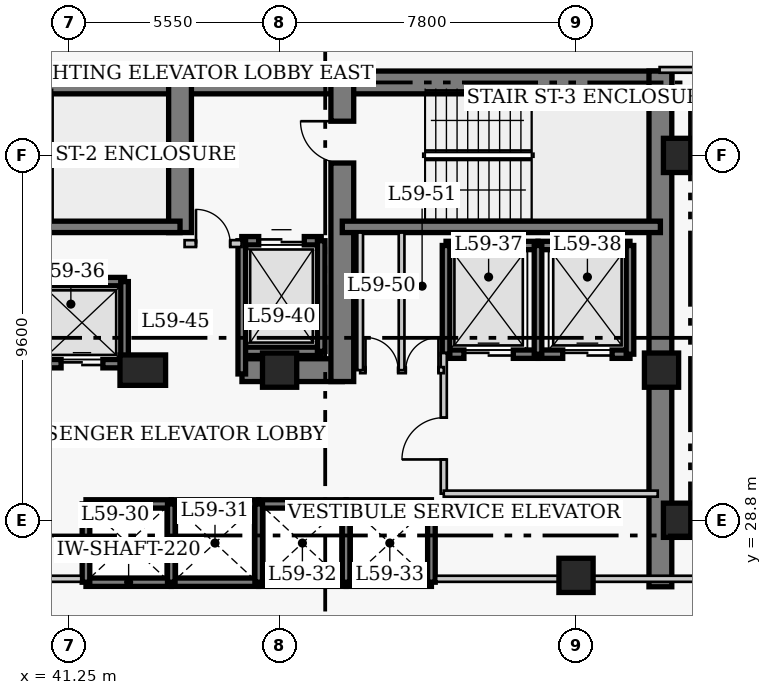
"""IFC4 building model, lengths in metres.
Left out: names, types, materials, properties, quantities, classifications, styles, units other than length and angle.
Written with IfcOpenShell. Run it as: python <this file> out.ifc"""

import sys

from ifc_helpers import new_model, si_unit, direction, frame, frame_2d, origin, origin_2d, place, context, subcontext, project, spatial, rectangle, extrude, element, fill, save


model = new_model("IFC4")
c1 = context("Model", 3, precision=1e-05, world=origin(), true_north=direction((0.0, 1.0)))
c2 = subcontext(c1, "Body", "Model", "MODEL_VIEW")
j1 = project(units=[si_unit("LENGTHUNIT", "METRE"), si_unit("PLANEANGLEUNIT", "RADIAN")], contexts=[c1])
p1 = place(None, origin())
s1 = spatial("IfcSite", under=j1, at=p1, CompositionType="ELEMENT")
p2 = place(p1, origin())
s2 = spatial("IfcBuilding", under=s1, at=p2, CompositionType="ELEMENT")
p3 = place(p2, frame((0.0, 0.0, 236.5)))
s3 = spatial("IfcBuildingStorey", under=s2, at=p3, CompositionType="ELEMENT", Elevation=236.5)
p4 = place(p3, frame((35.85, 40.32, 0.0), z_axis=(0.0, 0.0, 1.0), x_axis=(1.0, 0.0, 0.0)))
e1 = element("IfcWall", 1, at=p4, inside=s3, PredefinedType="SHEAR", context=c2, shape_type="SweptSolid", body=[
    extrude(rectangle(XDim=12.6, YDim=0.6, at=frame_2d((6.3, 0.0))), origin(), (0.0, 0.0, 1.0), 3.9),
])
p5 = place(p3, frame((48.45, 40.32, 0.0), z_axis=(0.0, 0.0, 1.0), x_axis=(1.0, 0.0, 0.0)))
e2 = element("IfcWall", 2, at=p5, inside=s3, PredefinedType="SHEAR", context=c2, shape_type="SweptSolid", body=[
    extrude(rectangle(XDim=8.67, YDim=0.6, at=frame_2d((4.335, 0.0))), origin(), (0.0, 0.0, 1.0), 3.9),
])
p6 = place(p3, frame((56.82, 27.05, 0.0), z_axis=(0.0, 0.0, 1.0), x_axis=(0.0, 1.0, 0.0)))
e3 = element("IfcWall", 3, at=p6, inside=s3, PredefinedType="SHEAR", context=c2, shape_type="SweptSolid", body=[
    extrude(rectangle(XDim=13.57, YDim=0.6, at=frame_2d((6.785, 0.0))), origin(), (0.0, 0.0, 1.0), 3.9),
])
p7 = place(p3, frame((45.81, 32.75, 0.0), z_axis=(0.0, 0.0, 1.0), x_axis=(1.0, 0.0, 0.0)))
e4 = element("IfcWall", 4, at=p7, inside=s3, PredefinedType="SHEAR", context=c2, shape_type="SweptSolid", body=[
    extrude(rectangle(XDim=2.64, YDim=0.6, at=frame_2d((1.32, 0.0))), origin(), (0.0, 0.0, 1.0), 3.9),
])
p8 = place(p3, frame((44.18, 36.37, 0.0), z_axis=(0.0, 0.0, 1.0), x_axis=(0.0, 1.0, 0.0)))
e5 = element("IfcWall", 5, at=p8, inside=s3, PredefinedType="SHEAR", context=c2, shape_type="SweptSolid", body=[
    extrude(rectangle(XDim=3.95, YDim=0.6, at=frame_2d((1.975, 0.0))), origin(), (0.0, 0.0, 1.0), 3.9),
])
p9 = place(p3, frame((48.45, 32.45, 0.0), z_axis=(0.0, 0.0, 1.0), x_axis=(0.0, 1.0, 0.0)))
e6 = element("IfcWall", 6, at=p9, inside=s3, PredefinedType="SHEAR", context=c2, shape_type="SweptSolid", body=[
    extrude(rectangle(XDim=7.87, YDim=0.6, at=frame_2d((3.935, 0.0))), origin(), (0.0, 0.0, 1.0), 3.9),
])
p10 = place(p9, frame((5.75, 0.0, 0.0)))
e7 = element("IfcOpeningElement", 7, at=p10, cuts=e6, PredefinedType="OPENING", context=c2, shape_type="SweptSolid", body=[
    extrude(rectangle(XDim=1.1, YDim=2.15, at=frame_2d((0.55, 1.075))), frame((0.0, 0.31, 0.0), z_axis=(0.0, -1.0, 0.0), x_axis=(1.0, 0.0, 0.0)), (0.0, 0.0, 1.0), 0.62),
])
p11 = place(p3, frame((35.85, 36.52, 0.0), z_axis=(0.0, 0.0, 1.0), x_axis=(1.0, 0.0, 0.0)))
e8 = element("IfcWall", 8, at=p11, inside=s3, PredefinedType="SHEAR", context=c2, shape_type="SweptSolid", body=[
    extrude(rectangle(XDim=8.33, YDim=0.3, at=frame_2d((4.165, 0.0))), origin(), (0.0, 0.0, 1.0), 3.9),
])
p12 = place(p3, frame((48.45, 36.52, 0.0), z_axis=(0.0, 0.0, 1.0), x_axis=(1.0, 0.0, 0.0)))
e9 = element("IfcWall", 9, at=p12, inside=s3, PredefinedType="SHEAR", context=c2, shape_type="SweptSolid", body=[
    extrude(rectangle(XDim=8.37, YDim=0.3, at=frame_2d((4.185, 0.0))), origin(), (0.0, 0.0, 1.0), 3.9),
])
for number, where, z_axis, x_axis in (
    (10, (57.35, 28.8, 0.0), (0.0, 0.0, 1.0), (1.0, 0.0, 0.0)),
    (11, (57.35, 38.4, 0.0), (0.0, 0.0, 1.0), (1.0, 0.0, 0.0)),
):
    element("IfcColumn", number, at=place(p3, frame(where, z_axis=z_axis, x_axis=x_axis)), inside=s3, PredefinedType="COLUMN", context=c2, shape_type="SweptSolid", body=[
        extrude(rectangle(XDim=0.9, YDim=0.9, at=origin_2d()), origin(), (0.0, 0.0, 1.0), 3.9),
    ])
p13 = place(p3, frame((43.2, 32.75, 0.0), z_axis=(0.0, 0.0, 1.0), x_axis=(1.0, 0.0, 0.0)))
e12 = element("IfcColumn", 12, at=p13, inside=s3, PredefinedType="COLUMN", context=c2, shape_type="SweptSolid", body=[
    extrude(rectangle(XDim=1.2, YDim=0.8, at=origin_2d()), origin(), (0.0, 0.0, 1.0), 3.9),
])
for number, where, z_axis, x_axis in (
    (13, (46.8, 32.75, 0.0), (0.0, 0.0, 1.0), (1.0, 0.0, 0.0)),
    (14, (54.6, 27.35, 0.0), (0.0, 0.0, 1.0), (1.0, 0.0, 0.0)),
    (15, (56.85, 32.75, 0.0), (0.0, 0.0, 1.0), (1.0, 0.0, 0.0)),
):
    element("IfcColumn", number, at=place(p3, frame(where, z_axis=z_axis, x_axis=x_axis)), inside=s3, PredefinedType="COLUMN", context=c2, shape_type="SweptSolid", body=[
        extrude(rectangle(XDim=0.9, YDim=0.9, at=origin_2d()), origin(), (0.0, 0.0, 1.0), 3.9),
    ])
for number, where, z_axis, x_axis in (
    (16, (41.705, 29.23, 0.0), (0.0, 0.0, 1.0), (1.0, 0.0, 0.0)),
    (17, (41.705, 27.17, 0.0), (0.0, 0.0, 1.0), (1.0, 0.0, 0.0)),
):
    element("IfcWall", number, at=place(p3, frame(where, z_axis=z_axis, x_axis=x_axis)), inside=s3, PredefinedType="SHEAR", context=c2, shape_type="SweptSolid", body=[
        extrude(rectangle(XDim=2.245, YDim=0.22, at=frame_2d((1.123, 0.0))), origin(), (0.0, 0.0, 1.0), 3.9),
    ])
p14 = place(p3, frame((41.705, 27.17, 0.0), z_axis=(0.0, 0.0, 1.0), x_axis=(0.0, 1.0, 0.0)))
e18 = element("IfcWall", 18, at=p14, inside=s3, PredefinedType="SHEAR", context=c2, shape_type="SweptSolid", body=[
    extrude(rectangle(XDim=2.06, YDim=0.2, at=frame_2d((1.03, 0.0))), origin(), (0.0, 0.0, 1.0), 3.9),
])
for number, where, z_axis, x_axis in (
    (19, (43.95, 29.23, 0.0), (0.0, 0.0, 1.0), (1.0, 0.0, 0.0)),
    (20, (43.95, 27.17, 0.0), (0.0, 0.0, 1.0), (1.0, 0.0, 0.0)),
):
    element("IfcWall", number, at=place(p3, frame(where, z_axis=z_axis, x_axis=x_axis)), inside=s3, PredefinedType="SHEAR", context=c2, shape_type="SweptSolid", body=[
        extrude(rectangle(XDim=2.3, YDim=0.22, at=frame_2d((1.15, 0.0))), origin(), (0.0, 0.0, 1.0), 3.9),
    ])
p15 = place(p3, frame((43.95, 27.17, 0.0), z_axis=(0.0, 0.0, 1.0), x_axis=(0.0, 1.0, 0.0)))
e21 = element("IfcWall", 21, at=p15, inside=s3, PredefinedType="SHEAR", context=c2, shape_type="SweptSolid", body=[
    extrude(rectangle(XDim=2.06, YDim=0.2, at=frame_2d((1.03, 0.0))), origin(), (0.0, 0.0, 1.0), 3.9),
])
for number, where, z_axis, x_axis in (
    (22, (46.25, 29.23, 0.0), (0.0, 0.0, 1.0), (1.0, 0.0, 0.0)),
    (23, (46.25, 27.17, 0.0), (0.0, 0.0, 1.0), (1.0, 0.0, 0.0)),
):
    element("IfcWall", number, at=place(p3, frame(where, z_axis=z_axis, x_axis=x_axis)), inside=s3, PredefinedType="SHEAR", context=c2, shape_type="SweptSolid", body=[
        extrude(rectangle(XDim=2.3, YDim=0.22, at=frame_2d((1.15, 0.0))), origin(), (0.0, 0.0, 1.0), 3.9),
    ])
p16 = place(p3, frame((46.25, 27.17, 0.0), z_axis=(0.0, 0.0, 1.0), x_axis=(0.0, 1.0, 0.0)))
e24 = element("IfcWall", 24, at=p16, inside=s3, PredefinedType="SHEAR", context=c2, shape_type="SweptSolid", body=[
    extrude(rectangle(XDim=2.06, YDim=0.2, at=frame_2d((1.03, 0.0))), origin(), (0.0, 0.0, 1.0), 3.9),
])
for number, where, z_axis, x_axis in (
    (25, (48.55, 29.23, 0.0), (0.0, 0.0, 1.0), (1.0, 0.0, 0.0)),
    (26, (48.55, 27.17, 0.0), (0.0, 0.0, 1.0), (1.0, 0.0, 0.0)),
):
    element("IfcWall", number, at=place(p3, frame(where, z_axis=z_axis, x_axis=x_axis)), inside=s3, PredefinedType="SHEAR", context=c2, shape_type="SweptSolid", body=[
        extrude(rectangle(XDim=2.245, YDim=0.22, at=frame_2d((1.123, 0.0))), origin(), (0.0, 0.0, 1.0), 3.9),
    ])
for number, where, z_axis, x_axis in (
    (27, (48.55, 27.17, 0.0), (0.0, 0.0, 1.0), (0.0, 1.0, 0.0)),
    (28, (50.795, 27.17, 0.0), (0.0, 0.0, 1.0), (0.0, 1.0, 0.0)),
):
    element("IfcWall", number, at=place(p3, frame(where, z_axis=z_axis, x_axis=x_axis)), inside=s3, PredefinedType="SHEAR", context=c2, shape_type="SweptSolid", body=[
        extrude(rectangle(XDim=2.06, YDim=0.2, at=frame_2d((1.03, 0.0))), origin(), (0.0, 0.0, 1.0), 3.9),
    ])
p17 = place(p3, frame((40.4, 35.08, 0.0), z_axis=(0.0, 0.0, 1.0), x_axis=(1.0, 0.0, 0.0)))
e29 = element("IfcWall", 29, at=p17, inside=s3, PredefinedType="SHEAR", context=c2, shape_type="SweptSolid", body=[
    extrude(rectangle(XDim=2.32, YDim=0.22, at=frame_2d((1.16, 0.0))), origin(), (0.0, 0.0, 1.0), 3.9),
])
p18 = place(p3, frame((40.4, 32.92, 0.0), z_axis=(0.0, 0.0, 1.0), x_axis=(1.0, 0.0, 0.0)))
e30 = element("IfcWall", 30, at=p18, inside=s3, PredefinedType="SHEAR", context=c2, shape_type="SweptSolid", body=[
    extrude(rectangle(XDim=2.32, YDim=0.22, at=frame_2d((1.16, 0.0))), origin(), (0.0, 0.0, 1.0), 3.9),
])
p19 = place(p18, frame((0.65, 0.0, 0.0)))
e31 = element("IfcOpeningElement", 31, at=p19, cuts=e30, PredefinedType="OPENING", context=c2, shape_type="SweptSolid", body=[
    extrude(rectangle(XDim=1.1, YDim=2.15, at=frame_2d((0.55, 1.075))), frame((0.0, 0.12, 0.0), z_axis=(0.0, -1.0, 0.0), x_axis=(1.0, 0.0, 0.0)), (0.0, 0.0, 1.0), 0.24),
])
p20 = place(p3, frame((42.72, 32.92, 0.0), z_axis=(0.0, 0.0, 1.0), x_axis=(0.0, 1.0, 0.0)))
e32 = element("IfcWall", 32, at=p20, inside=s3, PredefinedType="SHEAR", context=c2, shape_type="SweptSolid", body=[
    extrude(rectangle(XDim=2.16, YDim=0.2, at=frame_2d((1.08, 0.0))), origin(), (0.0, 0.0, 1.0), 3.9),
])
p21 = place(p3, frame((51.18, 36.03, 0.0), z_axis=(0.0, 0.0, 1.0), x_axis=(1.0, 0.0, 0.0)))
e33 = element("IfcWall", 33, at=p21, inside=s3, PredefinedType="SHEAR", context=c2, shape_type="SweptSolid", body=[
    extrude(rectangle(XDim=2.42, YDim=0.22, at=frame_2d((1.21, 0.0))), origin(), (0.0, 0.0, 1.0), 3.9),
])
p22 = place(p3, frame((51.18, 33.17, 0.0), z_axis=(0.0, 0.0, 1.0), x_axis=(1.0, 0.0, 0.0)))
e34 = element("IfcWall", 34, at=p22, inside=s3, PredefinedType="SHEAR", context=c2, shape_type="SweptSolid", body=[
    extrude(rectangle(XDim=2.42, YDim=0.22, at=frame_2d((1.21, 0.0))), origin(), (0.0, 0.0, 1.0), 3.9),
])
p23 = place(p22, frame((0.47, 0.0, 0.0)))
e35 = element("IfcOpeningElement", 35, at=p23, cuts=e34, PredefinedType="OPENING", context=c2, shape_type="SweptSolid", body=[
    extrude(rectangle(XDim=1.3, YDim=2.15, at=frame_2d((0.65, 1.075))), frame((0.0, 0.12, 0.0), z_axis=(0.0, -1.0, 0.0), x_axis=(1.0, 0.0, 0.0)), (0.0, 0.0, 1.0), 0.24),
])
p24 = place(p3, frame((51.18, 33.17, 0.0), z_axis=(0.0, 0.0, 1.0), x_axis=(0.0, 1.0, 0.0)))
e36 = element("IfcWall", 36, at=p24, inside=s3, PredefinedType="SHEAR", context=c2, shape_type="SweptSolid", body=[
    extrude(rectangle(XDim=2.86, YDim=0.2, at=frame_2d((1.43, 0.0))), origin(), (0.0, 0.0, 1.0), 3.9),
])
p25 = place(p3, frame((53.6, 36.03, 0.0), z_axis=(0.0, 0.0, 1.0), x_axis=(1.0, 0.0, 0.0)))
e37 = element("IfcWall", 37, at=p25, inside=s3, PredefinedType="SHEAR", context=c2, shape_type="SweptSolid", body=[
    extrude(rectangle(XDim=2.42, YDim=0.22, at=frame_2d((1.21, 0.0))), origin(), (0.0, 0.0, 1.0), 3.9),
])
p26 = place(p3, frame((53.6, 33.17, 0.0), z_axis=(0.0, 0.0, 1.0), x_axis=(1.0, 0.0, 0.0)))
e38 = element("IfcWall", 38, at=p26, inside=s3, PredefinedType="SHEAR", context=c2, shape_type="SweptSolid", body=[
    extrude(rectangle(XDim=2.42, YDim=0.22, at=frame_2d((1.21, 0.0))), origin(), (0.0, 0.0, 1.0), 3.9),
])
p27 = place(p26, frame((0.65, 0.0, 0.0)))
e39 = element("IfcOpeningElement", 39, at=p27, cuts=e38, PredefinedType="OPENING", context=c2, shape_type="SweptSolid", body=[
    extrude(rectangle(XDim=1.3, YDim=2.15, at=frame_2d((0.65, 1.075))), frame((0.0, 0.12, 0.0), z_axis=(0.0, -1.0, 0.0), x_axis=(1.0, 0.0, 0.0)), (0.0, 0.0, 1.0), 0.24),
])
for number, where, z_axis, x_axis in (
    (40, (53.6, 33.17, 0.0), (0.0, 0.0, 1.0), (0.0, 1.0, 0.0)),
    (41, (56.02, 33.17, 0.0), (0.0, 0.0, 1.0), (0.0, 1.0, 0.0)),
):
    element("IfcWall", number, at=place(p3, frame(where, z_axis=z_axis, x_axis=x_axis)), inside=s3, PredefinedType="SHEAR", context=c2, shape_type="SweptSolid", body=[
        extrude(rectangle(XDim=2.86, YDim=0.2, at=frame_2d((1.43, 0.0))), origin(), (0.0, 0.0, 1.0), 3.9),
    ])
p28 = place(p3, frame((45.805, 36.155, 0.0), z_axis=(0.0, 0.0, 1.0), x_axis=(1.0, 0.0, 0.0)))
e42 = element("IfcWall", 42, at=p28, inside=s3, PredefinedType="SHEAR", context=c2, shape_type="SweptSolid", body=[
    extrude(rectangle(XDim=2.09, YDim=0.22, at=frame_2d((1.045, 0.0))), origin(), (0.0, 0.0, 1.0), 3.9),
])
p29 = place(p28, frame((0.445, 0.0, 0.0)))
e43 = element("IfcOpeningElement", 43, at=p29, cuts=e42, PredefinedType="OPENING", context=c2, shape_type="SweptSolid", body=[
    extrude(rectangle(XDim=1.2, YDim=2.15, at=frame_2d((0.6, 1.075))), frame((0.0, 0.12, 0.0), z_axis=(0.0, -1.0, 0.0), x_axis=(1.0, 0.0, 0.0)), (0.0, 0.0, 1.0), 0.24),
])
p30 = place(p3, frame((45.805, 33.245, 0.0), z_axis=(0.0, 0.0, 1.0), x_axis=(1.0, 0.0, 0.0)))
e44 = element("IfcWall", 44, at=p30, inside=s3, PredefinedType="SHEAR", context=c2, shape_type="SweptSolid", body=[
    extrude(rectangle(XDim=2.09, YDim=0.22, at=frame_2d((1.045, 0.0))), origin(), (0.0, 0.0, 1.0), 3.9),
])
p31 = place(p3, frame((45.805, 32.65, 0.0), z_axis=(0.0, 0.0, 1.0), x_axis=(0.0, 1.0, 0.0)))
e45 = element("IfcWall", 45, at=p31, inside=s3, PredefinedType="SHEAR", context=c2, shape_type="SweptSolid", body=[
    extrude(rectangle(XDim=3.505, YDim=0.2, at=frame_2d((1.752, 0.0))), origin(), (0.0, 0.0, 1.0), 3.9),
])
p32 = place(p3, frame((47.895, 33.245, 0.0), z_axis=(0.0, 0.0, 1.0), x_axis=(0.0, 1.0, 0.0)))
e46 = element("IfcWall", 46, at=p32, inside=s3, PredefinedType="SHEAR", context=c2, shape_type="SweptSolid", body=[
    extrude(rectangle(XDim=2.91, YDim=0.2, at=frame_2d((1.455, 0.0))), origin(), (0.0, 0.0, 1.0), 3.9),
])
p33 = place(p3, frame((44.3, 36.08, 0.0), z_axis=(0.0, 0.0, 1.0), x_axis=(1.0, 0.0, 0.0)))
e47 = element("IfcWall", 47, at=p33, inside=s3, PredefinedType="PARTITIONING", context=c2, shape_type="SweptSolid", body=[
    extrude(rectangle(XDim=1.5, YDim=0.18, at=frame_2d((0.75, 0.0))), origin(), (0.0, 0.0, 1.0), 3.52),
])
p34 = place(p33, frame((0.3, 0.0, 0.0)))
e48 = element("IfcOpeningElement", 48, at=p34, cuts=e47, PredefinedType="OPENING", context=c2, shape_type="SweptSolid", body=[
    extrude(rectangle(XDim=0.9, YDim=2.15, at=frame_2d((0.45, 1.075))), frame((0.0, 0.1, 0.0), z_axis=(0.0, -1.0, 0.0), x_axis=(1.0, 0.0, 0.0)), (0.0, 0.0, 1.0), 0.2),
])
p35 = place(p3, frame((51.12, 29.5, 0.0), z_axis=(0.0, 0.0, 1.0), x_axis=(0.0, 1.0, 0.0)))
e49 = element("IfcWall", 49, at=p35, inside=s3, PredefinedType="PARTITIONING", context=c2, shape_type="SweptSolid", body=[
    extrude(rectangle(XDim=3.7, YDim=0.16, at=frame_2d((1.85, 0.0))), origin(), (0.0, 0.0, 1.0), 3.52),
])
p36 = place(p35, frame((0.9, 0.0, 0.0)))
e50 = element("IfcOpeningElement", 50, at=p36, cuts=e49, PredefinedType="OPENING", context=c2, shape_type="SweptSolid", body=[
    extrude(rectangle(XDim=1.1, YDim=2.15, at=frame_2d((0.55, 1.075))), frame((0.0, 0.09, 0.0), z_axis=(0.0, -1.0, 0.0), x_axis=(1.0, 0.0, 0.0)), (0.0, 0.0, 1.0), 0.18),
])
p37 = place(p3, frame((51.12, 29.5, 0.0), z_axis=(0.0, 0.0, 1.0), x_axis=(1.0, 0.0, 0.0)))
e51 = element("IfcWall", 51, at=p37, inside=s3, PredefinedType="PARTITIONING", context=c2, shape_type="SweptSolid", body=[
    extrude(rectangle(XDim=5.63, YDim=0.16, at=frame_2d((2.815, 0.0))), origin(), (0.0, 0.0, 1.0), 3.52),
])
p38 = place(p3, frame((48.92, 32.75, 0.0), z_axis=(0.0, 0.0, 1.0), x_axis=(1.0, 0.0, 0.0)))
e52 = element("IfcWall", 52, at=p38, inside=s3, PredefinedType="PARTITIONING", context=c2, shape_type="SweptSolid", body=[
    extrude(rectangle(XDim=2.2, YDim=0.16, at=frame_2d((1.1, 0.0))), origin(), (0.0, 0.0, 1.0), 3.52),
])
p39 = place(p38, frame((0.14, 0.0, 0.0)))
e53 = element("IfcOpeningElement", 53, at=p39, cuts=e52, PredefinedType="OPENING", context=c2, shape_type="SweptSolid", body=[
    extrude(rectangle(XDim=0.86, YDim=2.05, at=frame_2d((0.43, 1.025))), frame((0.0, 0.09, 0.0), z_axis=(0.0, -1.0, 0.0), x_axis=(1.0, 0.0, 0.0)), (0.0, 0.0, 1.0), 0.18),
])
p40 = place(p38, frame((1.2, 0.0, 0.0)))
e54 = element("IfcOpeningElement", 54, at=p40, cuts=e52, PredefinedType="OPENING", context=c2, shape_type="SweptSolid", body=[
    extrude(rectangle(XDim=0.86, YDim=2.05, at=frame_2d((0.43, 1.025))), frame((0.0, 0.09, 0.0), z_axis=(0.0, -1.0, 0.0), x_axis=(1.0, 0.0, 0.0)), (0.0, 0.0, 1.0), 0.18),
])
for number, where, z_axis, x_axis in (
    (55, (48.92, 32.75, 0.0), (0.0, 0.0, 1.0), (0.0, 1.0, 0.0)),
    (56, (50.01, 32.75, 0.0), (0.0, 0.0, 1.0), (0.0, 1.0, 0.0)),
):
    element("IfcWall", number, at=place(p3, frame(where, z_axis=z_axis, x_axis=x_axis)), inside=s3, PredefinedType="PARTITIONING", context=c2, shape_type="SweptSolid", body=[
        extrude(rectangle(XDim=3.62, YDim=0.15, at=frame_2d((1.81, 0.0))), origin(), (0.0, 0.0, 1.0), 3.52),
    ])
p41 = place(p3, frame((35.85, 27.26, 0.0), z_axis=(0.0, 0.0, 1.0), x_axis=(1.0, 0.0, 0.0)))
e57 = element("IfcWall", 57, at=p41, inside=s3, PredefinedType="PARTITIONING", context=c2, shape_type="SweptSolid", body=[
    extrude(rectangle(XDim=5.73, YDim=0.16, at=frame_2d((2.865, 0.0))), origin(), (0.0, 0.0, 1.0), 3.52),
])
p42 = place(p3, frame((50.92, 27.26, 0.0), z_axis=(0.0, 0.0, 1.0), x_axis=(1.0, 0.0, 0.0)))
e58 = element("IfcWall", 58, at=p42, inside=s3, PredefinedType="PARTITIONING", context=c2, shape_type="SweptSolid", body=[
    extrude(rectangle(XDim=8.08, YDim=0.16, at=frame_2d((4.04, 0.0))), origin(), (0.0, 0.0, 1.0), 3.52),
])
p43 = place(p3, frame((56.8, 40.65, 0.0), z_axis=(0.0, 0.0, 1.0), x_axis=(1.0, 0.0, 0.0)))
e59 = element("IfcWall", 59, at=p43, inside=s3, PredefinedType="PARTITIONING", context=c2, shape_type="SweptSolid", body=[
    extrude(rectangle(XDim=4.36, YDim=0.15, at=frame_2d((2.18, 0.0))), origin(), (0.0, 0.0, 1.0), 3.52),
])
p44 = place(p43, frame((2.75, 0.0, 0.0)))
e60 = element("IfcOpeningElement", 60, at=p44, cuts=e59, PredefinedType="OPENING", context=c2, shape_type="SweptSolid", body=[
    extrude(rectangle(XDim=1.0, YDim=2.15, at=frame_2d((0.5, 1.075))), frame((0.0, 0.085, 0.0), z_axis=(0.0, -1.0, 0.0), x_axis=(1.0, 0.0, 0.0)), (0.0, 0.0, 1.0), 0.17),
])
p45 = place(p19, origin())
e61 = element("IfcDoor", 61, at=p45, inside=s3, OperationType="DOUBLE_DOOR_SLIDING", PredefinedType="DOOR", context=c2, shape_type="SweptSolid", body=[
    extrude(rectangle(XDim=1.1, YDim=2.15, at=frame_2d((0.55, 1.075))), frame((0.0, 0.025, 0.0), z_axis=(0.0, -1.0, 0.0), x_axis=(1.0, 0.0, 0.0)), (0.0, 0.0, 1.0), 0.05),
])
fill(e31, e61)
p46 = place(p23, origin())
e62 = element("IfcDoor", 62, at=p46, inside=s3, OperationType="DOUBLE_DOOR_SLIDING", PredefinedType="DOOR", context=c2, shape_type="SweptSolid", body=[
    extrude(rectangle(XDim=1.3, YDim=2.15, at=frame_2d((0.65, 1.075))), frame((0.0, 0.025, 0.0), z_axis=(0.0, -1.0, 0.0), x_axis=(1.0, 0.0, 0.0)), (0.0, 0.0, 1.0), 0.05),
])
fill(e35, e62)
p47 = place(p27, origin())
e63 = element("IfcDoor", 63, at=p47, inside=s3, OperationType="DOUBLE_DOOR_SLIDING", PredefinedType="DOOR", context=c2, shape_type="SweptSolid", body=[
    extrude(rectangle(XDim=1.3, YDim=2.15, at=frame_2d((0.65, 1.075))), frame((0.0, 0.025, 0.0), z_axis=(0.0, -1.0, 0.0), x_axis=(1.0, 0.0, 0.0)), (0.0, 0.0, 1.0), 0.05),
])
fill(e39, e63)
p48 = place(p29, origin())
e64 = element("IfcDoor", 64, at=p48, inside=s3, OperationType="DOUBLE_DOOR_SLIDING", PredefinedType="DOOR", context=c2, shape_type="SweptSolid", body=[
    extrude(rectangle(XDim=1.2, YDim=2.15, at=frame_2d((0.6, 1.075))), frame((0.0, 0.025, 0.0), z_axis=(0.0, -1.0, 0.0), x_axis=(1.0, 0.0, 0.0)), (0.0, 0.0, 1.0), 0.05),
])
fill(e43, e64)
p49 = place(p34, origin())
e65 = element("IfcDoor", 65, at=p49, inside=s3, OperationType="SINGLE_SWING_LEFT", PredefinedType="DOOR", context=c2, shape_type="SweptSolid", body=[
    extrude(rectangle(XDim=0.9, YDim=2.15, at=frame_2d((0.45, 1.075))), frame((0.0, 0.025, 0.0), z_axis=(0.0, -1.0, 0.0), x_axis=(1.0, 0.0, 0.0)), (0.0, 0.0, 1.0), 0.05),
])
fill(e48, e65)
p50 = place(p36, origin())
e66 = element("IfcDoor", 66, at=p50, inside=s3, OperationType="SINGLE_SWING_LEFT", PredefinedType="DOOR", context=c2, shape_type="SweptSolid", body=[
    extrude(rectangle(XDim=1.1, YDim=2.15, at=frame_2d((0.55, 1.075))), frame((0.0, 0.025, 0.0), z_axis=(0.0, -1.0, 0.0), x_axis=(1.0, 0.0, 0.0)), (0.0, 0.0, 1.0), 0.05),
])
fill(e50, e66)
p51 = place(p39, origin())
e67 = element("IfcDoor", 67, at=p51, inside=s3, OperationType="SINGLE_SWING_LEFT", PredefinedType="DOOR", context=c2, shape_type="SweptSolid", body=[
    extrude(rectangle(XDim=0.86, YDim=2.05, at=frame_2d((0.43, 1.025))), frame((0.0, 0.025, 0.0), z_axis=(0.0, -1.0, 0.0), x_axis=(1.0, 0.0, 0.0)), (0.0, 0.0, 1.0), 0.05),
])
fill(e53, e67)
p52 = place(p40, origin())
e68 = element("IfcDoor", 68, at=p52, inside=s3, OperationType="SINGLE_SWING_RIGHT", PredefinedType="DOOR", context=c2, shape_type="SweptSolid", body=[
    extrude(rectangle(XDim=0.86, YDim=2.05, at=frame_2d((0.43, 1.025))), frame((0.0, 0.025, 0.0), z_axis=(0.0, -1.0, 0.0), x_axis=(1.0, 0.0, 0.0)), (0.0, 0.0, 1.0), 0.05),
])
fill(e54, e68)
p53 = place(p10, origin())
e69 = element("IfcDoor", 69, at=p53, inside=s3, OperationType="SINGLE_SWING_RIGHT", PredefinedType="DOOR", context=c2, shape_type="SweptSolid", body=[
    extrude(rectangle(XDim=1.1, YDim=2.15, at=frame_2d((0.55, 1.075))), frame((0.0, 0.025, 0.0), z_axis=(0.0, -1.0, 0.0), x_axis=(1.0, 0.0, 0.0)), (0.0, 0.0, 1.0), 0.05),
])
fill(e7, e69)
save(model, sys.argv[1])
